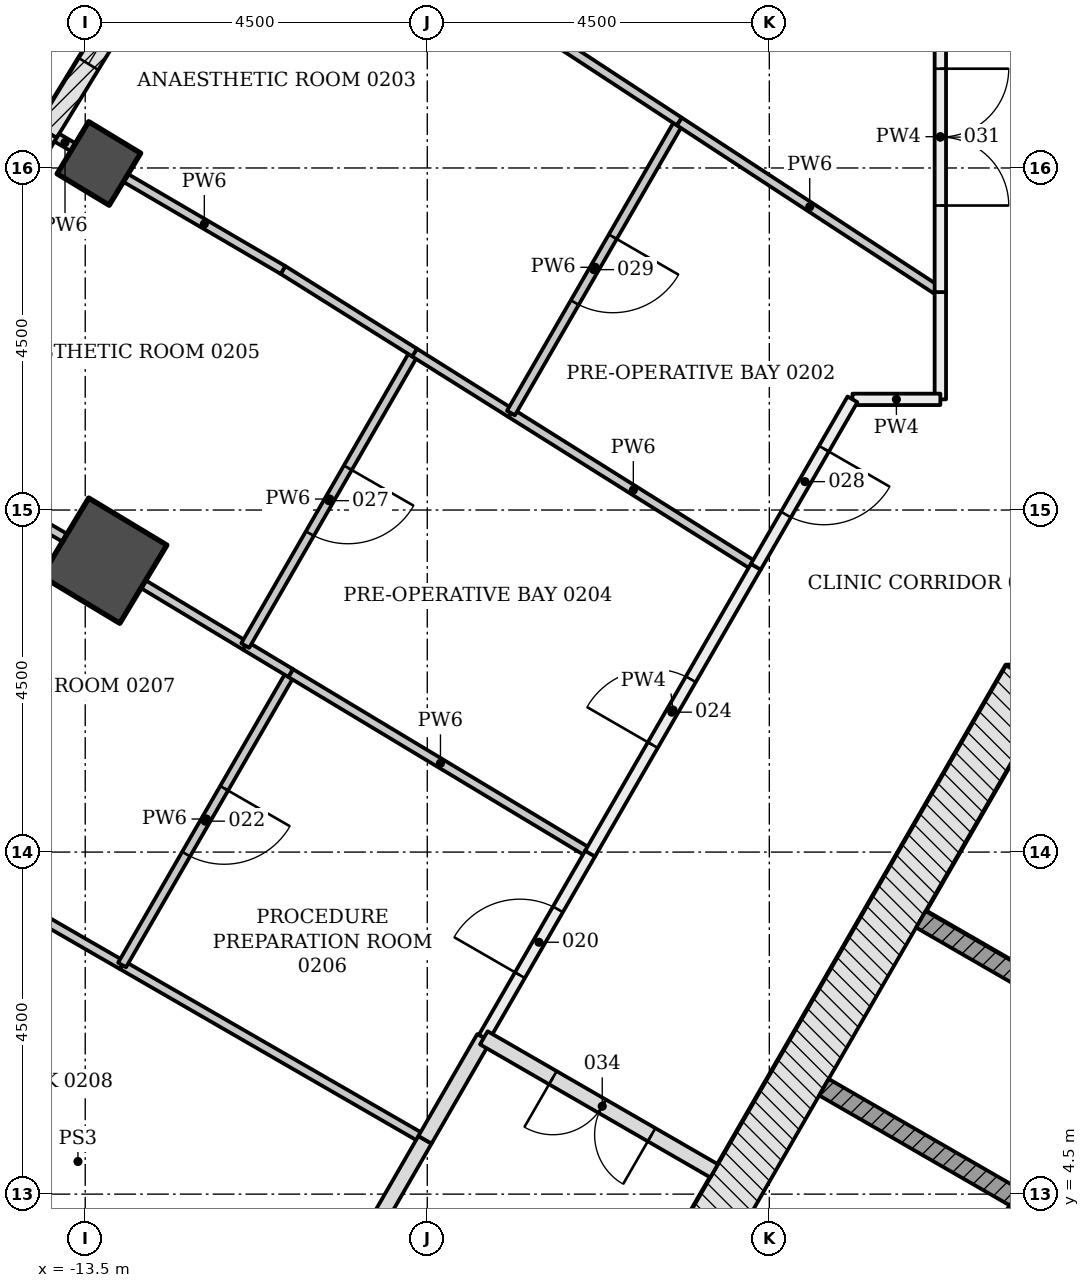
"""IFC4 building model, lengths in metres.
Left out: names, types, materials, properties, quantities, classifications, styles, units other than length and angle.
Written with IfcOpenShell. Run it as: python <this file> out.ifc"""

import sys

from ifc_helpers import new_model, si_unit, direction, frame, frame_2d, origin, origin_2d, place, context, subcontext, project, spatial, rectangle, extrude, element, fill, save


model = new_model("IFC4")
c1 = context("Model", 3, precision=1e-05, world=origin(), true_north=direction((0.0, 1.0)))
c2 = subcontext(c1, "Body", "Model", "MODEL_VIEW")
j1 = project(units=[si_unit("LENGTHUNIT", "METRE"), si_unit("PLANEANGLEUNIT", "RADIAN")], contexts=[c1])
p1 = place(None, origin())
s1 = spatial("IfcSite", under=j1, at=p1, CompositionType="ELEMENT")
p2 = place(p1, origin())
s2 = spatial("IfcBuilding", under=s1, at=p2, CompositionType="ELEMENT")
p3 = place(p2, frame((0.0, 0.0, 10.5)))
s3 = spatial("IfcBuildingStorey", under=s2, at=p3, CompositionType="ELEMENT", Elevation=10.5)
p4 = place(p3, frame((-13.25, 12.834, -0.25), z_axis=(0.0, 0.0, 1.0), x_axis=(-0.856599929156, 0.515981163775, 0.0)))
e1 = element("IfcColumn", 1, at=p4, inside=s3, PredefinedType="COLUMN", context=c2, shape_type="SweptSolid", body=[
    extrude(rectangle(XDim=1.2, YDim=1.2, at=origin_2d()), origin(), (0.0, 0.0, 1.0), 4.5),
])
p5 = place(p3, frame((-13.32, 18.059, -0.25), z_axis=(0.0, 0.0, 1.0), x_axis=(-0.855574189811, 0.517680215702, 0.0)))
e2 = element("IfcColumn", 2, at=p5, inside=s3, PredefinedType="COLUMN", context=c2, shape_type="SweptSolid", body=[
    extrude(rectangle(XDim=0.8, YDim=0.8, at=origin_2d()), origin(), (0.0, 0.0, 1.0), 4.5),
])
p6 = place(p3, frame((1.386, 11.106, -0.25), z_axis=(0.0, 0.0, 1.0), x_axis=(-1.0, 0.0, 0.0)))
e3 = element("IfcWall", 3, at=p6, inside=s3, PredefinedType="SHEAR", context=c2, shape_type="SweptSolid", body=[
    extrude(rectangle(XDim=2.771, YDim=0.7, at=frame_2d((1.386, 0.0))), origin(), (0.0, 0.0, 1.0), 4.5),
])
p7 = place(p3, frame((-1.083, 11.281, -0.25), z_axis=(0.0, 0.0, 1.0), x_axis=(-0.500001446645, -0.866024568562, 0.0)))
e4 = element("IfcWall", 4, at=p7, inside=s3, PredefinedType="SHEAR", context=c2, shape_type="SweptSolid", body=[
    extrude(rectangle(XDim=18.458, YDim=0.7, at=frame_2d((9.229, 0.0))), origin(), (0.0, 0.0, 1.0), 4.5),
])
p8 = place(p7, frame((8.979, 0.0, 0.25)))
e5 = element("IfcOpeningElement", 5, at=p8, cuts=e4, PredefinedType="OPENING", context=c2, shape_type="SweptSolid", body=[
    extrude(rectangle(XDim=1.2, YDim=2.1, at=frame_2d((0.6, 1.05))), frame((0.0, 0.36, 0.0), z_axis=(0.0, -1.0, 0.0), x_axis=(1.0, 0.0, 0.0)), (0.0, 0.0, 1.0), 0.72),
])
p9 = place(p7, frame((11.029, 0.0, 0.25)))
e6 = element("IfcOpeningElement", 6, at=p9, cuts=e4, PredefinedType="OPENING", context=c2, shape_type="SweptSolid", body=[
    extrude(rectangle(XDim=1.2, YDim=2.1, at=frame_2d((0.6, 1.05))), frame((0.0, 0.36, 0.0), z_axis=(0.0, -1.0, 0.0), x_axis=(1.0, 0.0, 0.0)), (0.0, 0.0, 1.0), 0.72),
])
p10 = place(p3, frame((-14.004, 18.475, 0.0), z_axis=(0.0, 0.0, 1.0), x_axis=(0.522078085402, 0.852897691838, 0.0)))
e7 = element("IfcWall", 7, at=p10, inside=s3, PredefinedType="NOTDEFINED", context=c2, shape_type="SweptSolid", body=[
    extrude(rectangle(XDim=4.496, YDim=0.3, at=frame_2d((2.248, 0.0))), origin(), (0.0, 0.0, 1.0), 4.25),
])
p11 = place(p10, frame((1.048, 0.0, 0.9)))
e8 = element("IfcOpeningElement", 8, at=p11, cuts=e7, PredefinedType="OPENING", context=c2, shape_type="SweptSolid", body=[
    extrude(rectangle(XDim=2.4, YDim=2.4, at=frame_2d((1.2, 1.2))), frame((0.0, 0.16, 0.0), z_axis=(0.0, -1.0, 0.0), x_axis=(1.0, 0.0, 0.0)), (0.0, 0.0, 1.0), 0.32),
])
p12 = place(p3, frame((-16.313, 14.614, 0.0), z_axis=(0.0, 0.0, 1.0), x_axis=(0.513257465408, 0.858234684805, 0.0)))
e9 = element("IfcWall", 9, at=p12, inside=s3, PredefinedType="NOTDEFINED", context=c2, shape_type="SweptSolid", body=[
    extrude(rectangle(XDim=4.496, YDim=0.3, at=frame_2d((2.248, 0.0))), origin(), (0.0, 0.0, 1.0), 4.25),
])
p13 = place(p12, frame((1.198, 0.0, 0.8)))
e10 = element("IfcOpeningElement", 10, at=p13, cuts=e9, PredefinedType="OPENING", context=c2, shape_type="SweptSolid", body=[
    extrude(rectangle(XDim=2.1, YDim=3.0, at=frame_2d((1.05, 1.5))), frame((0.0, 0.16, 0.0), z_axis=(0.0, -1.0, 0.0), x_axis=(1.0, 0.0, 0.0)), (0.0, 0.0, 1.0), 0.32),
])
p14 = place(p3, frame((-2.506, 8.115, -0.25), z_axis=(0.0, 0.0, 1.0), x_axis=(0.865996321171, -0.50005036918, 0.0)))
e11 = element("IfcWall", 11, at=p14, inside=s3, PredefinedType="PARTITIONING", context=c2, shape_type="SweptSolid", body=[
    extrude(rectangle(XDim=2.9, YDim=0.25, at=frame_2d((1.45, 0.0))), origin(), (0.0, 0.0, 1.0), 4.5),
])
p15 = place(p3, frame((-3.781, 5.907, -0.25), z_axis=(0.0, 0.0, 1.0), x_axis=(0.866032775405, -0.499987231761, 0.0)))
e12 = element("IfcWall", 12, at=p15, inside=s3, PredefinedType="PARTITIONING", context=c2, shape_type="SweptSolid", body=[
    extrude(rectangle(XDim=2.9, YDim=0.25, at=frame_2d((1.45, 0.0))), origin(), (0.0, 0.0, 1.0), 4.5),
])
p16 = place(p3, frame((0.176, 6.711, 0.0), z_axis=(0.0, 0.0, 1.0), x_axis=(-0.500004227369, -0.866022963098, 0.0)))
e13 = element("IfcWall", 13, at=p16, inside=s3, PredefinedType="PARTITIONING", context=c2, shape_type="SweptSolid", body=[
    extrude(rectangle(XDim=11.8, YDim=0.25, at=frame_2d((5.9, 0.0))), origin(), (0.0, 0.0, 1.0), 4.25),
])
p17 = place(p3, frame((-11.208, 1.446, 0.0), z_axis=(0.0, 0.0, 1.0), x_axis=(-0.875125393946, 0.483896212912, 0.0)))
e14 = element("IfcWall", 14, at=p17, inside=s3, PredefinedType="PARTITIONING", context=c2, shape_type="SweptSolid", body=[
    extrude(rectangle(XDim=6.863, YDim=0.12, at=frame_2d((3.432, 0.0))), origin(), (0.0, 0.0, 1.0), 3.638),
])
p18 = place(p17, frame((2.95, 0.0, 0.0)))
e15 = element("IfcOpeningElement", 15, at=p18, cuts=e14, PredefinedType="OPENING", context=c2, shape_type="SweptSolid", body=[
    extrude(rectangle(XDim=1.0, YDim=2.1, at=frame_2d((0.5, 1.05))), frame((0.0, 0.07, 0.0), z_axis=(0.0, -1.0, 0.0), x_axis=(1.0, 0.0, 0.0)), (0.0, 0.0, 1.0), 0.14),
])
p19 = place(p3, frame((-9.031, 5.213, 0.0), z_axis=(0.0, 0.0, 1.0), x_axis=(-0.500044734646, -0.865999574684, 0.0)))
e16 = element("IfcWall", 16, at=p19, inside=s3, PredefinedType="PARTITIONING", context=c2, shape_type="SweptSolid", body=[
    extrude(rectangle(XDim=4.35, YDim=0.2, at=frame_2d((2.175, 0.0))), origin(), (0.0, 0.0, 1.0), 3.638),
])
p20 = place(p3, frame((-8.256, 6.556, 0.0), z_axis=(0.0, 0.0, 1.0), x_axis=(-0.499904469662, -0.866080551226, 0.0)))
e17 = element("IfcWall", 17, at=p20, inside=s3, PredefinedType="PARTITIONING", context=c2, shape_type="SweptSolid", body=[
    extrude(rectangle(XDim=1.548, YDim=0.2, at=frame_2d((0.774, 0.0))), origin(), (0.0, 0.0, 1.0), 3.638),
])
p21 = place(p3, frame((-5.226, 4.806, 0.0), z_axis=(0.0, 0.0, 1.0), x_axis=(-0.865949687125, 0.500131122175, 0.0)))
e18 = element("IfcWall", 18, at=p21, inside=s3, PredefinedType="PARTITIONING", context=c2, shape_type="SweptSolid", body=[
    extrude(rectangle(XDim=3.499, YDim=0.2, at=frame_2d((1.75, 0.0))), origin(), (0.0, 0.0, 1.0), 4.25),
])
p22 = place(p21, frame((0.95, 0.0, 0.0)))
e19 = element("IfcOpeningElement", 19, at=p22, cuts=e18, PredefinedType="OPENING", context=c2, shape_type="SweptSolid", body=[
    extrude(rectangle(XDim=1.5, YDim=2.1, at=frame_2d((0.75, 1.05))), frame((0.0, 0.11, 0.0), z_axis=(0.0, -1.0, 0.0), x_axis=(1.0, 0.0, 0.0)), (0.0, 0.0, 1.0), 0.22),
])
p23 = place(p3, frame((-9.032, 5.215, 0.0), z_axis=(0.0, 0.0, 1.0), x_axis=(-0.866130767322, 0.499817460578, 0.0)))
e20 = element("IfcWall", 20, at=p23, inside=s3, PredefinedType="PARTITIONING", context=c2, shape_type="SweptSolid", body=[
    extrude(rectangle(XDim=4.597, YDim=0.12, at=frame_2d((2.299, 0.0))), origin(), (0.0, 0.0, 1.0), 3.638),
])
p24 = place(p3, frame((-13.017, 7.515, 0.0), z_axis=(0.0, 0.0, 1.0), x_axis=(-0.866023771128, 0.500002827834, 0.0)))
e21 = element("IfcWall", 21, at=p24, inside=s3, PredefinedType="PARTITIONING", context=c2, shape_type="SweptSolid", body=[
    extrude(rectangle(XDim=5.226, YDim=0.12, at=frame_2d((2.613, 0.0))), origin(), (0.0, 0.0, 1.0), 3.638),
])
p25 = place(p3, frame((-10.797, 11.355, 0.0), z_axis=(0.0, 0.0, 1.0), x_axis=(-0.500117989508, -0.865957271793, 0.0)))
e22 = element("IfcWall", 22, at=p25, inside=s3, PredefinedType="PARTITIONING", context=c2, shape_type="SweptSolid", body=[
    extrude(rectangle(XDim=4.435, YDim=0.12, at=frame_2d((2.217, 0.0))), origin(), (0.0, 0.0, 1.0), 3.638),
])
p26 = place(p25, frame((1.75, 0.0, 0.0)))
e23 = element("IfcOpeningElement", 23, at=p26, cuts=e22, PredefinedType="OPENING", context=c2, shape_type="SweptSolid", body=[
    extrude(rectangle(XDim=1.0, YDim=2.1, at=frame_2d((0.5, 1.05))), frame((0.0, 0.07, 0.0), z_axis=(0.0, -1.0, 0.0), x_axis=(1.0, 0.0, 0.0)), (0.0, 0.0, 1.0), 0.14),
])
p27 = place(p3, frame((-6.857, 8.983, 0.0), z_axis=(0.0, 0.0, 1.0), x_axis=(-0.856751730158, 0.515729069251, 0.0)))
e24 = element("IfcWall", 24, at=p27, inside=s3, PredefinedType="PARTITIONING", context=c2, shape_type="SweptSolid", body=[
    extrude(rectangle(XDim=4.598, YDim=0.12, at=frame_2d((2.299, 0.0))), origin(), (0.0, 0.0, 1.0), 3.638),
])
p28 = place(p3, frame((-8.256, 6.558, 0.0), z_axis=(0.0, 0.0, 1.0), x_axis=(0.500081734942, 0.86597820895, 0.0)))
e25 = element("IfcWall", 25, at=p28, inside=s3, PredefinedType="PARTITIONING", context=c2, shape_type="SweptSolid", body=[
    extrude(rectangle(XDim=2.804, YDim=0.15, at=frame_2d((1.402, 0.0))), origin(), (0.0, 0.0, 1.0), 3.638),
])
p29 = place(p28, frame((0.95, 0.0, 0.0)))
e26 = element("IfcOpeningElement", 26, at=p29, cuts=e25, PredefinedType="OPENING", context=c2, shape_type="SweptSolid", body=[
    extrude(rectangle(XDim=1.0, YDim=2.1, at=frame_2d((0.5, 1.05))), frame((0.0, 0.085, 0.0), z_axis=(0.0, -1.0, 0.0), x_axis=(1.0, 0.0, 0.0)), (0.0, 0.0, 1.0), 0.17),
])
p30 = place(p3, frame((-10.798, 11.356, 0.0), z_axis=(0.0, 0.0, 1.0), x_axis=(-0.856627537291, 0.515935327686, 0.0)))
e27 = element("IfcWall", 27, at=p30, inside=s3, PredefinedType="PARTITIONING", context=c2, shape_type="SweptSolid", body=[
    extrude(rectangle(XDim=0.698, YDim=0.12, at=frame_2d((0.349, 0.0))), origin(), (0.0, 0.0, 1.0), 3.638),
])
p31 = place(p3, frame((-13.769, 13.135, 0.0), z_axis=(0.0, 0.0, 1.0), x_axis=(-0.864576979504, 0.50250039454, 0.0)))
e28 = element("IfcWall", 28, at=p31, inside=s3, PredefinedType="PARTITIONING", context=c2, shape_type="SweptSolid", body=[
    extrude(rectangle(XDim=2.792, YDim=0.12, at=frame_2d((1.396, 0.0))), origin(), (0.0, 0.0, 1.0), 3.633),
])
p32 = place(p3, frame((-11.397, 11.717, 0.0), z_axis=(0.0, 0.0, 1.0), x_axis=(-0.85652691333, 0.516102360721, 0.0)))
e29 = element("IfcWall", 29, at=p32, inside=s3, PredefinedType="PARTITIONING", context=c2, shape_type="SweptSolid", body=[
    extrude(rectangle(XDim=1.563, YDim=0.12, at=frame_2d((0.782, 0.0))), origin(), (0.0, 0.0, 1.0), 3.638),
])
p33 = place(p3, frame((-6.858, 8.979, 0.0), z_axis=(0.0, 0.0, 1.0), x_axis=(0.500105111742, 0.865964708986, 0.0)))
e30 = element("IfcWall", 30, at=p33, inside=s3, PredefinedType="PARTITIONING", context=c2, shape_type="SweptSolid", body=[
    extrude(rectangle(XDim=4.363, YDim=0.15, at=frame_2d((2.181, 0.0))), origin(), (0.0, 0.0, 1.0), 3.638),
])
p34 = place(p33, frame((1.65, 0.0, 0.0)))
e31 = element("IfcOpeningElement", 31, at=p34, cuts=e30, PredefinedType="OPENING", context=c2, shape_type="SweptSolid", body=[
    extrude(rectangle(XDim=1.0, YDim=2.1, at=frame_2d((0.5, 1.05))), frame((0.0, 0.085, 0.0), z_axis=(0.0, -1.0, 0.0), x_axis=(1.0, 0.0, 0.0)), (0.0, 0.0, 1.0), 0.17),
])
p35 = place(p3, frame((-9.17, 15.572, 0.0), z_axis=(0.0, 0.0, 1.0), x_axis=(-0.499902881486, -0.866081467924, 0.0)))
e32 = element("IfcWall", 32, at=p35, inside=s3, PredefinedType="PARTITIONING", context=c2, shape_type="SweptSolid", body=[
    extrude(rectangle(XDim=4.451, YDim=0.12, at=frame_2d((2.226, 0.0))), origin(), (0.0, 0.0, 1.0), 3.638),
])
p36 = place(p35, frame((1.75, 0.0, 0.0)))
e33 = element("IfcOpeningElement", 33, at=p36, cuts=e32, PredefinedType="OPENING", context=c2, shape_type="SweptSolid", body=[
    extrude(rectangle(XDim=1.0, YDim=2.1, at=frame_2d((0.5, 1.05))), frame((0.0, 0.07, 0.0), z_axis=(0.0, -1.0, 0.0), x_axis=(1.0, 0.0, 0.0)), (0.0, 0.0, 1.0), 0.14),
])
p37 = place(p3, frame((-4.68, 12.753, 0.0), z_axis=(0.0, 0.0, 1.0), x_axis=(-0.846844902979, 0.531839929206, 0.0)))
e34 = element("IfcWall", 34, at=p37, inside=s3, PredefinedType="PARTITIONING", context=c2, shape_type="SweptSolid", body=[
    extrude(rectangle(XDim=3.8, YDim=0.12, at=frame_2d((1.9, 0.0))), origin(), (0.0, 0.0, 1.0), 3.638),
])
p38 = place(p3, frame((-7.901, 14.776, 0.0), z_axis=(0.0, 0.0, 1.0), x_axis=(-0.847002237732, 0.531589323892, 0.0)))
e35 = element("IfcWall", 35, at=p38, inside=s3, PredefinedType="PARTITIONING", context=c2, shape_type="SweptSolid", body=[
    extrude(rectangle(XDim=1.503, YDim=0.12, at=frame_2d((0.751, 0.0))), origin(), (0.0, 0.0, 1.0), 3.638),
])
p39 = place(p3, frame((-2.25, 16.367, 0.0), z_axis=(0.0, 0.0, 1.0), x_axis=(0.0, -1.0, 0.0)))
e36 = element("IfcWall", 36, at=p39, inside=s3, PredefinedType="PARTITIONING", context=c2, shape_type="SweptSolid", body=[
    extrude(rectangle(XDim=1.411, YDim=0.15, at=frame_2d((0.706, 0.0))), origin(), (0.0, 0.0, 1.0), 3.638),
])
p40 = place(p3, frame((-2.25, 14.956, 0.0), z_axis=(0.0, 0.0, 1.0), x_axis=(-1.0, 0.0, 0.0)))
e37 = element("IfcWall", 37, at=p40, inside=s3, PredefinedType="PARTITIONING", context=c2, shape_type="SweptSolid", body=[
    extrude(rectangle(XDim=1.156, YDim=0.15, at=frame_2d((0.578, 0.0))), origin(), (0.0, 0.0, 1.0), 4.25),
])
p41 = place(p3, frame((-3.406, 14.956, 0.0), z_axis=(0.0, 0.0, 1.0), x_axis=(-0.499999364504, -0.866025770688, 0.0)))
e38 = element("IfcWall", 38, at=p41, inside=s3, PredefinedType="PARTITIONING", context=c2, shape_type="SweptSolid", body=[
    extrude(rectangle(XDim=2.544, YDim=0.15, at=frame_2d((1.272, 0.0))), origin(), (0.0, 0.0, 1.0), 3.638),
])
p42 = place(p41, frame((0.75, 0.0, 0.0)))
e39 = element("IfcOpeningElement", 39, at=p42, cuts=e38, PredefinedType="OPENING", context=c2, shape_type="SweptSolid", body=[
    extrude(rectangle(XDim=1.0, YDim=2.1, at=frame_2d((0.5, 1.05))), frame((0.0, 0.085, 0.0), z_axis=(0.0, -1.0, 0.0), x_axis=(1.0, 0.0, 0.0)), (0.0, 0.0, 1.0), 0.17),
])
p43 = place(p3, frame((-2.25, 20.456, 0.0), z_axis=(0.0, 0.0, 1.0), x_axis=(0.0, -1.0, 0.0)))
e40 = element("IfcWall", 40, at=p43, inside=s3, PredefinedType="PARTITIONING", context=c2, shape_type="SweptSolid", body=[
    extrude(rectangle(XDim=4.089, YDim=0.15, at=frame_2d((2.044, 0.0))), origin(), (0.0, 0.0, 1.0), 3.638),
])
p44 = place(p43, frame((1.15, 0.0, 0.0)))
e41 = element("IfcOpeningElement", 41, at=p44, cuts=e40, PredefinedType="OPENING", context=c2, shape_type="SweptSolid", body=[
    extrude(rectangle(XDim=1.8, YDim=2.1, at=frame_2d((0.9, 1.05))), frame((0.0, 0.085, 0.0), z_axis=(0.0, -1.0, 0.0), x_axis=(1.0, 0.0, 0.0)), (0.0, 0.0, 1.0), 0.17),
])
p45 = place(p3, frame((-13.658, 18.273, 0.0), z_axis=(0.0, 0.0, 1.0), x_axis=(-0.863885093979, 0.503688936151, 0.0)))
e42 = element("IfcWall", 42, at=p45, inside=s3, PredefinedType="PARTITIONING", context=c2, shape_type="SweptSolid", body=[
    extrude(rectangle(XDim=0.25, YDim=0.12, at=frame_2d((0.125, 0.0))), origin(), (0.0, 0.0, 1.0), 4.25),
])
p46 = place(p3, frame((-9.166, 15.571, 0.0), z_axis=(0.0, 0.0, 1.0), x_axis=(-0.84701751501, 0.531564981227, 0.0)))
e43 = element("IfcWall", 43, at=p46, inside=s3, PredefinedType="PARTITIONING", context=c2, shape_type="SweptSolid", body=[
    extrude(rectangle(XDim=2.045, YDim=0.12, at=frame_2d((1.022, 0.0))), origin(), (0.0, 0.0, 1.0), 3.638),
])
p47 = place(p3, frame((-10.898, 16.658, 0.0), z_axis=(0.0, 0.0, 1.0), x_axis=(-0.863161652457, 0.504927679701, 0.0)))
e44 = element("IfcWall", 44, at=p47, inside=s3, PredefinedType="PARTITIONING", context=c2, shape_type="SweptSolid", body=[
    extrude(rectangle(XDim=2.398, YDim=0.12, at=frame_2d((1.199, 0.0))), origin(), (0.0, 0.0, 1.0), 3.638),
])
p48 = place(p3, frame((-5.684, 18.611, 0.0), z_axis=(0.0, 0.0, 1.0), x_axis=(-0.500099413844, -0.865967999567, 0.0)))
e45 = element("IfcWall", 45, at=p48, inside=s3, PredefinedType="PARTITIONING", context=c2, shape_type="SweptSolid", body=[
    extrude(rectangle(XDim=4.429, YDim=0.12, at=frame_2d((2.214, 0.0))), origin(), (0.0, 0.0, 1.0), 3.638),
])
p49 = place(p48, frame((1.75, 0.0, 0.0)))
e46 = element("IfcOpeningElement", 46, at=p49, cuts=e45, PredefinedType="OPENING", context=c2, shape_type="SweptSolid", body=[
    extrude(rectangle(XDim=1.0, YDim=2.1, at=frame_2d((0.5, 1.05))), frame((0.0, 0.07, 0.0), z_axis=(0.0, -1.0, 0.0), x_axis=(1.0, 0.0, 0.0)), (0.0, 0.0, 1.0), 0.14),
])
p50 = place(p3, frame((-2.252, 16.367, 0.0), z_axis=(0.0, 0.0, 1.0), x_axis=(-0.836925574982, 0.547316710819, 0.0)))
e47 = element("IfcWall", 47, at=p50, inside=s3, PredefinedType="PARTITIONING", context=c2, shape_type="SweptSolid", body=[
    extrude(rectangle(XDim=4.102, YDim=0.12, at=frame_2d((2.051, 0.0))), origin(), (0.0, 0.0, 1.0), 3.638),
])
p51 = place(p3, frame((-5.685, 18.612, 0.0), z_axis=(0.0, 0.0, 1.0), x_axis=(-0.836813840242, 0.547487531163, 0.0)))
e48 = element("IfcWall", 48, at=p51, inside=s3, PredefinedType="PARTITIONING", context=c2, shape_type="SweptSolid", body=[
    extrude(rectangle(XDim=2.734, YDim=0.12, at=frame_2d((1.367, 0.0))), origin(), (0.0, 0.0, 1.0), 3.638),
])
p52 = place(p11, origin())
e49 = element("IfcWindow", 49, at=p52, inside=s3, PartitioningType="DOUBLE_PANEL_VERTICAL", PredefinedType="WINDOW", context=c2, shape_type="SweptSolid", body=[
    extrude(rectangle(XDim=2.4, YDim=2.4, at=frame_2d((1.2, 1.2))), frame((0.0, 0.03, 0.0), z_axis=(0.0, -1.0, 0.0), x_axis=(1.0, 0.0, 0.0)), (0.0, 0.0, 1.0), 0.06),
])
fill(e8, e49)
p53 = place(p29, origin())
e50 = element("IfcDoor", 50, at=p53, inside=s3, OperationType="SINGLE_SWING_RIGHT", PredefinedType="DOOR", context=c2, shape_type="SweptSolid", body=[
    extrude(rectangle(XDim=1.0, YDim=2.1, at=frame_2d((0.5, 1.05))), frame((0.0, 0.025, 0.0), z_axis=(0.0, -1.0, 0.0), x_axis=(1.0, 0.0, 0.0)), (0.0, 0.0, 1.0), 0.05),
])
fill(e26, e50)
p54 = place(p26, origin())
e51 = element("IfcDoor", 51, at=p54, inside=s3, OperationType="SINGLE_SWING_LEFT", PredefinedType="DOOR", context=c2, shape_type="SweptSolid", body=[
    extrude(rectangle(XDim=1.0, YDim=2.1, at=frame_2d((0.5, 1.05))), frame((0.0, 0.025, 0.0), z_axis=(0.0, -1.0, 0.0), x_axis=(1.0, 0.0, 0.0)), (0.0, 0.0, 1.0), 0.05),
])
fill(e23, e51)
p55 = place(p34, origin())
e52 = element("IfcDoor", 52, at=p55, inside=s3, OperationType="SINGLE_SWING_LEFT", PredefinedType="DOOR", context=c2, shape_type="SweptSolid", body=[
    extrude(rectangle(XDim=1.0, YDim=2.1, at=frame_2d((0.5, 1.05))), frame((0.0, 0.025, 0.0), z_axis=(0.0, -1.0, 0.0), x_axis=(1.0, 0.0, 0.0)), (0.0, 0.0, 1.0), 0.05),
])
fill(e31, e52)
p56 = place(p36, origin())
e53 = element("IfcDoor", 53, at=p56, inside=s3, OperationType="SINGLE_SWING_LEFT", PredefinedType="DOOR", context=c2, shape_type="SweptSolid", body=[
    extrude(rectangle(XDim=1.0, YDim=2.1, at=frame_2d((0.5, 1.05))), frame((0.0, 0.025, 0.0), z_axis=(0.0, -1.0, 0.0), x_axis=(1.0, 0.0, 0.0)), (0.0, 0.0, 1.0), 0.05),
])
fill(e33, e53)
p57 = place(p42, origin())
e54 = element("IfcDoor", 54, at=p57, inside=s3, OperationType="SINGLE_SWING_RIGHT", PredefinedType="DOOR", context=c2, shape_type="SweptSolid", body=[
    extrude(rectangle(XDim=1.0, YDim=2.1, at=frame_2d((0.5, 1.05))), frame((0.0, 0.025, 0.0), z_axis=(0.0, -1.0, 0.0), x_axis=(1.0, 0.0, 0.0)), (0.0, 0.0, 1.0), 0.05),
])
fill(e39, e54)
p58 = place(p49, origin())
e55 = element("IfcDoor", 55, at=p58, inside=s3, OperationType="SINGLE_SWING_LEFT", PredefinedType="DOOR", context=c2, shape_type="SweptSolid", body=[
    extrude(rectangle(XDim=1.0, YDim=2.1, at=frame_2d((0.5, 1.05))), frame((0.0, 0.025, 0.0), z_axis=(0.0, -1.0, 0.0), x_axis=(1.0, 0.0, 0.0)), (0.0, 0.0, 1.0), 0.05),
])
fill(e46, e55)
p59 = place(p44, origin())
e56 = element("IfcDoor", 56, at=p59, inside=s3, OperationType="DOUBLE_DOOR_SINGLE_SWING", PredefinedType="DOOR", context=c2, shape_type="SweptSolid", body=[
    extrude(rectangle(XDim=1.8, YDim=2.1, at=frame_2d((0.9, 1.05))), frame((0.0, 0.025, 0.0), z_axis=(0.0, -1.0, 0.0), x_axis=(1.0, 0.0, 0.0)), (0.0, 0.0, 1.0), 0.05),
])
fill(e41, e56)
p60 = place(p22, origin())
e57 = element("IfcDoor", 57, at=p60, inside=s3, OperationType="DOUBLE_DOOR_SINGLE_SWING", PredefinedType="DOOR", context=c2, shape_type="SweptSolid", body=[
    extrude(rectangle(XDim=1.5, YDim=2.1, at=frame_2d((0.75, 1.05))), frame((0.0, 0.025, 0.0), z_axis=(0.0, -1.0, 0.0), x_axis=(1.0, 0.0, 0.0)), (0.0, 0.0, 1.0), 0.05),
])
fill(e19, e57)
save(model, sys.argv[1])
